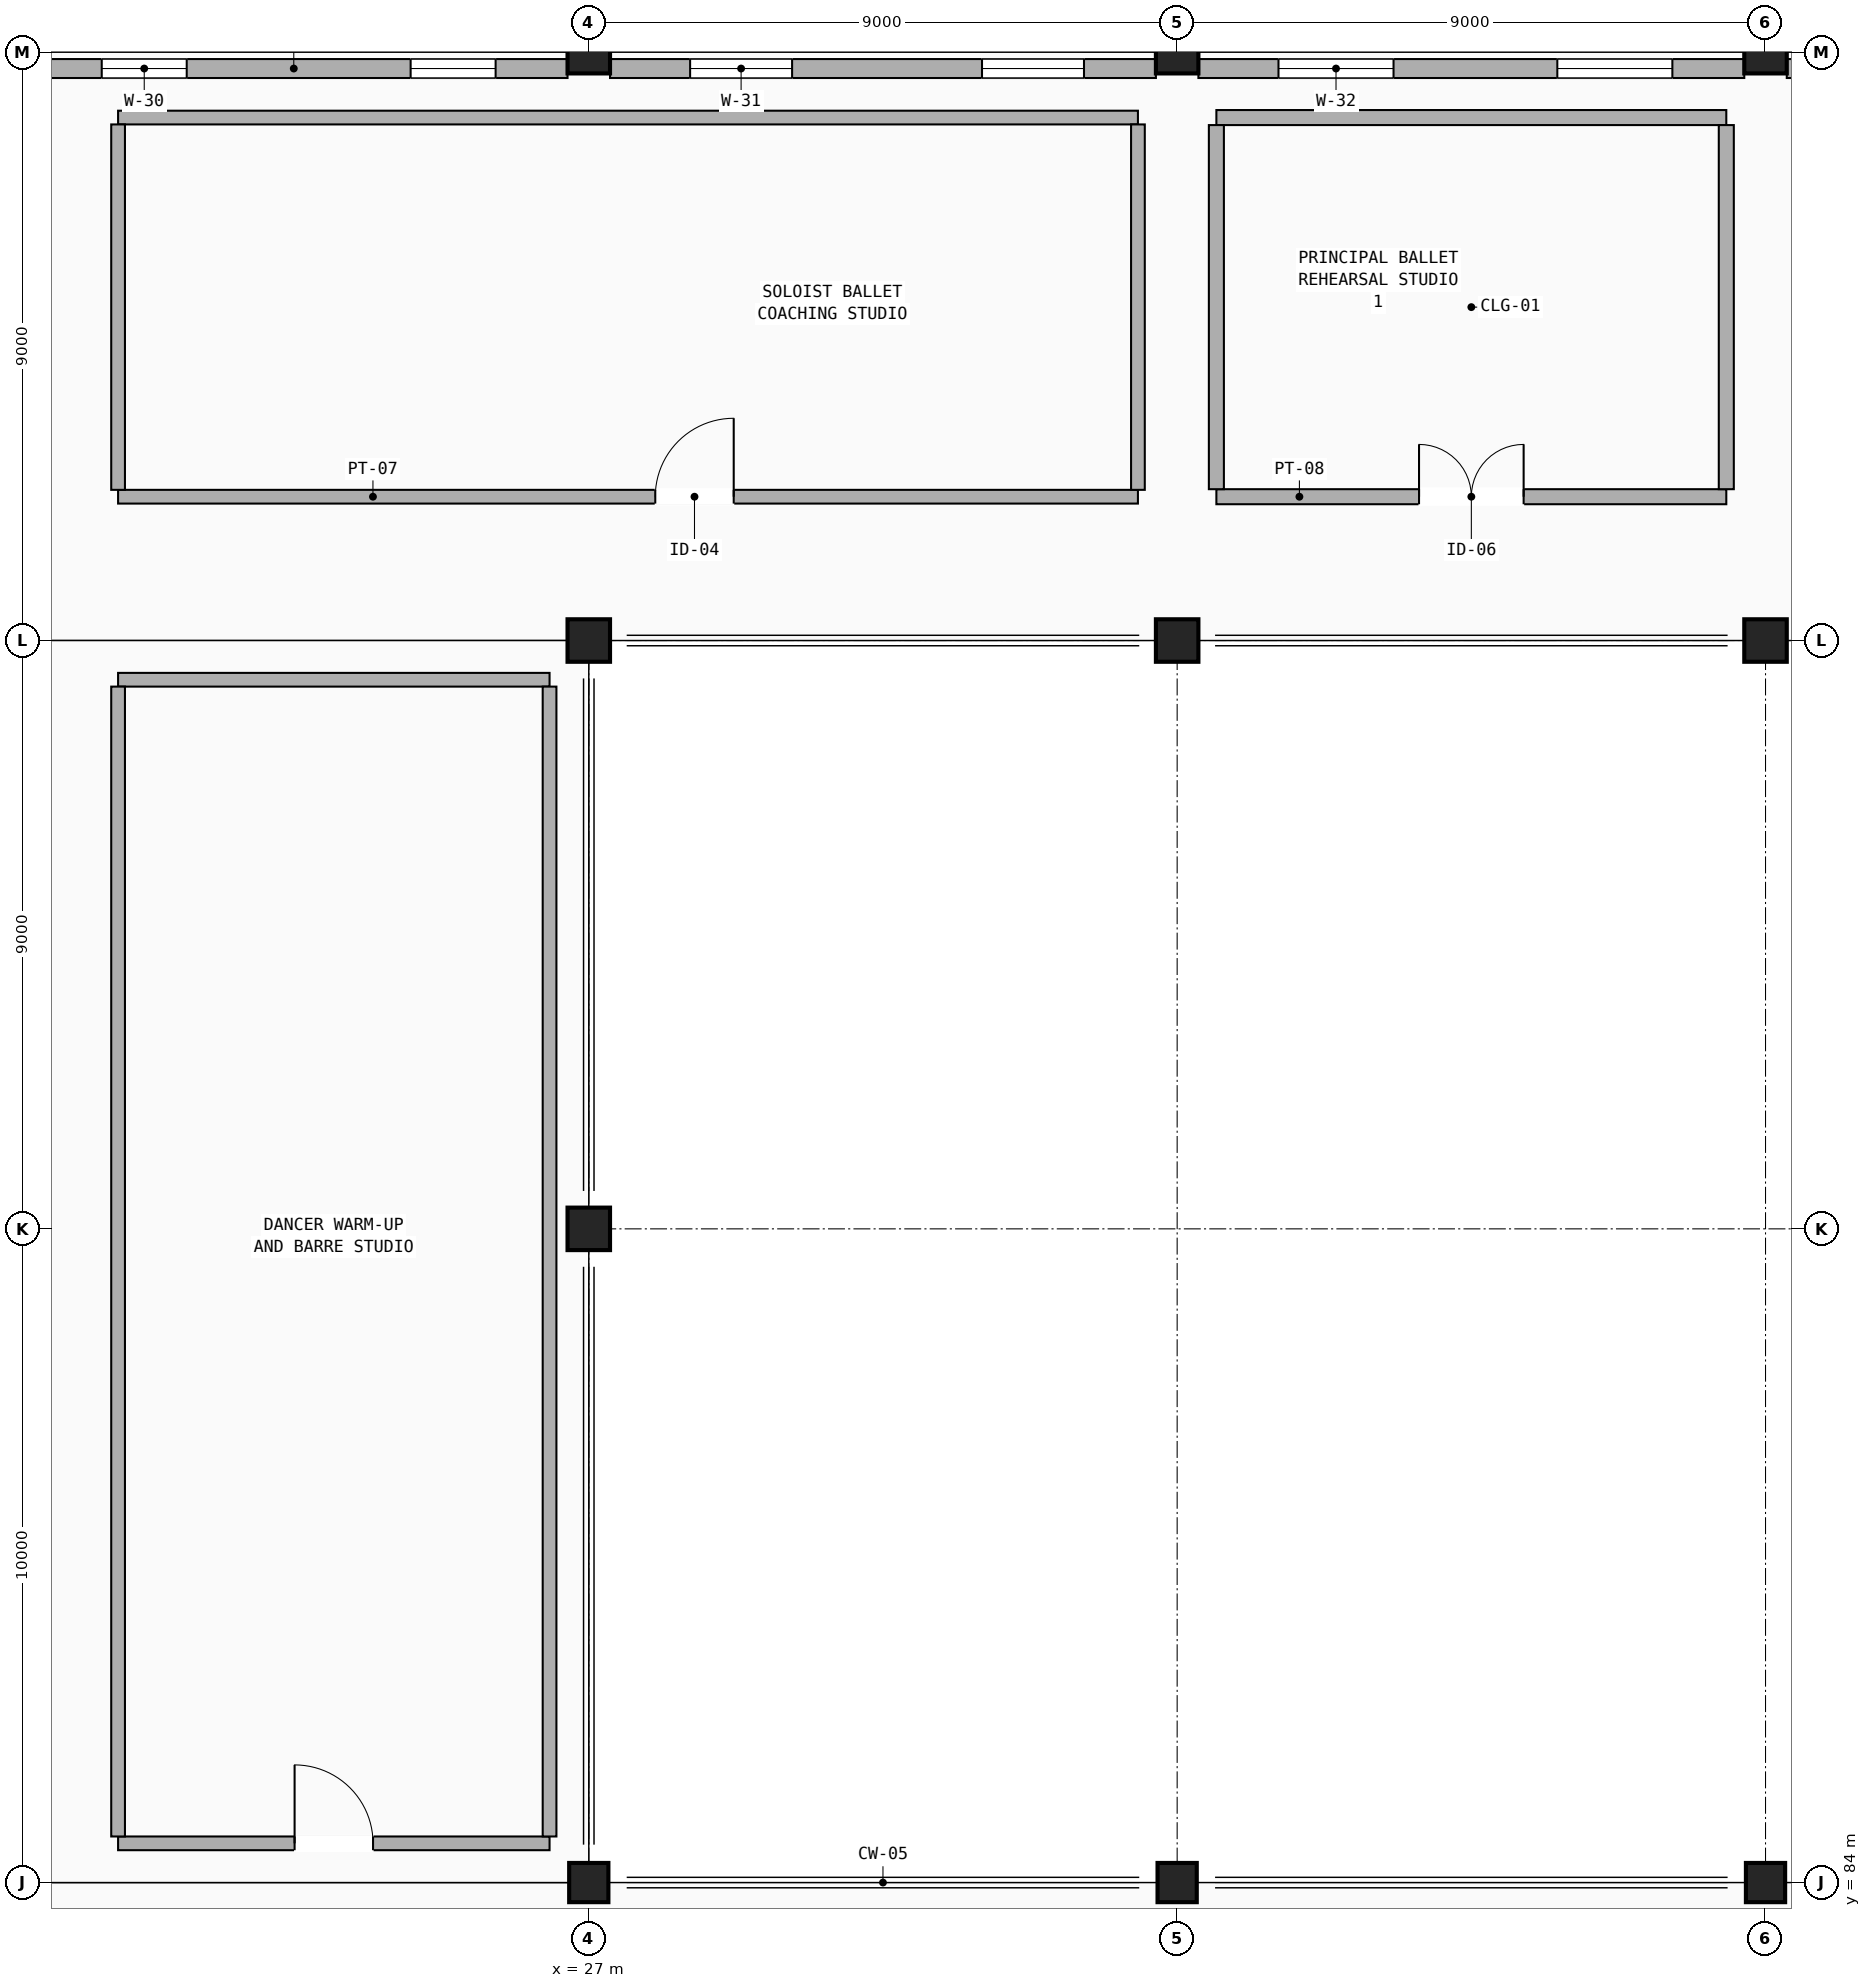
"""IFC4 building model, lengths in metres.
Left out: names, types, materials, properties, quantities, classifications, styles, units other than length and angle.
Written with IfcOpenShell. Run it as: python <this file> out.ifc"""

import sys

from ifc_helpers import new_model, si_unit, direction, frame, frame_2d, origin, origin_2d, place, context, subcontext, project, spatial, rectangle, extrude, element, fill, save


model = new_model("IFC4")
c1 = context("Model", 3, precision=1e-05, world=origin(), true_north=direction((0.0, 1.0)))
c2 = subcontext(c1, "Body", "Model", "MODEL_VIEW")
j1 = project(units=[si_unit("LENGTHUNIT", "METRE"), si_unit("PLANEANGLEUNIT", "RADIAN")], contexts=[c1])
p1 = place(None, origin())
s1 = spatial("IfcSite", under=j1, at=p1, CompositionType="ELEMENT")
p2 = place(p1, origin())
s2 = spatial("IfcBuilding", under=s1, at=p2, CompositionType="ELEMENT")
p3 = place(p2, frame((0.0, 0.0, 13.6)))
s3 = spatial("IfcBuildingStorey", under=s2, at=p3, CompositionType="ELEMENT", Elevation=13.6)
p4 = place(p3, frame((27.0, 84.0, 0.0), z_axis=(0.0, 0.0, 1.0), x_axis=(1.0, 0.0, 0.0)))
e1 = element("IfcColumn", 1, at=p4, inside=s3, PredefinedType="COLUMN", context=c2, shape_type="SweptSolid", body=[
    extrude(rectangle(XDim=0.6, YDim=0.6, at=origin_2d()), origin(), (0.0, 0.0, 1.0), 4.08),
])
for number, where, z_axis, x_axis in (
    (2, (27.0, 94.0, 0.0), (0.0, 0.0, 1.0), (1.0, 0.0, 0.0)),
    (3, (27.0, 103.0, 0.0), (0.0, 0.0, 1.0), (1.0, 0.0, 0.0)),
    (4, (27.0, 112.0, 0.0), (0.0, 0.0, 1.0), (1.0, 0.0, 0.0)),
):
    element("IfcColumn", number, at=place(p3, frame(where, z_axis=z_axis, x_axis=x_axis)), inside=s3, PredefinedType="COLUMN", context=c2, shape_type="SweptSolid", body=[
        extrude(rectangle(XDim=0.65, YDim=0.65, at=origin_2d()), origin(), (0.0, 0.0, 1.0), 4.08),
    ])
p5 = place(p3, frame((36.0, 84.0, 0.0), z_axis=(0.0, 0.0, 1.0), x_axis=(1.0, 0.0, 0.0)))
e5 = element("IfcColumn", 5, at=p5, inside=s3, PredefinedType="COLUMN", context=c2, shape_type="SweptSolid", body=[
    extrude(rectangle(XDim=0.6, YDim=0.6, at=origin_2d()), origin(), (0.0, 0.0, 1.0), 4.08),
])
for number, where, z_axis, x_axis in (
    (6, (36.0, 103.0, 0.0), (0.0, 0.0, 1.0), (1.0, 0.0, 0.0)),
    (7, (36.0, 112.0, 0.0), (0.0, 0.0, 1.0), (1.0, 0.0, 0.0)),
):
    element("IfcColumn", number, at=place(p3, frame(where, z_axis=z_axis, x_axis=x_axis)), inside=s3, PredefinedType="COLUMN", context=c2, shape_type="SweptSolid", body=[
        extrude(rectangle(XDim=0.65, YDim=0.65, at=origin_2d()), origin(), (0.0, 0.0, 1.0), 4.08),
    ])
p6 = place(p3, frame((45.0, 84.0, 0.0), z_axis=(0.0, 0.0, 1.0), x_axis=(1.0, 0.0, 0.0)))
e8 = element("IfcColumn", 8, at=p6, inside=s3, PredefinedType="COLUMN", context=c2, shape_type="SweptSolid", body=[
    extrude(rectangle(XDim=0.6, YDim=0.6, at=origin_2d()), origin(), (0.0, 0.0, 1.0), 4.08),
])
for number, where, z_axis, x_axis in (
    (9, (45.0, 103.0, 0.0), (0.0, 0.0, 1.0), (1.0, 0.0, 0.0)),
    (10, (45.0, 112.0, 0.0), (0.0, 0.0, 1.0), (1.0, 0.0, 0.0)),
):
    element("IfcColumn", number, at=place(p3, frame(where, z_axis=z_axis, x_axis=x_axis)), inside=s3, PredefinedType="COLUMN", context=c2, shape_type="SweptSolid", body=[
        extrude(rectangle(XDim=0.65, YDim=0.65, at=origin_2d()), origin(), (0.0, 0.0, 1.0), 4.08),
    ])
p7 = place(p3, frame((18.3, 111.75, 0.0), z_axis=(0.0, 0.0, 1.0), x_axis=(1.0, 0.0, 0.0)))
e11 = element("IfcWall", 11, at=p7, inside=s3, PredefinedType="STANDARD", context=c2, shape_type="SweptSolid", body=[
    extrude(rectangle(XDim=8.375, YDim=0.29, at=frame_2d((4.188, 0.0))), origin(), (0.0, 0.0, 1.0), 3.277),
])
p8 = place(p7, frame((1.25, 0.0, 0.9)))
e12 = element("IfcOpeningElement", 12, at=p8, cuts=e11, PredefinedType="OPENING", context=c2, shape_type="SweptSolid", body=[
    extrude(rectangle(XDim=1.3, YDim=1.72, at=frame_2d((0.65, 0.86))), frame((0.0, 0.155, 0.0), z_axis=(0.0, -1.0, 0.0), x_axis=(1.0, 0.0, 0.0)), (0.0, 0.0, 1.0), 0.31),
])
p9 = place(p7, frame((5.975, 0.0, 0.9)))
e13 = element("IfcOpeningElement", 13, at=p9, cuts=e11, PredefinedType="OPENING", context=c2, shape_type="SweptSolid", body=[
    extrude(rectangle(XDim=1.3, YDim=1.72, at=frame_2d((0.65, 0.86))), frame((0.0, 0.155, 0.0), z_axis=(0.0, -1.0, 0.0), x_axis=(1.0, 0.0, 0.0)), (0.0, 0.0, 1.0), 0.31),
])
p10 = place(p3, frame((27.325, 111.75, 0.0), z_axis=(0.0, 0.0, 1.0), x_axis=(1.0, 0.0, 0.0)))
e14 = element("IfcWall", 14, at=p10, inside=s3, PredefinedType="STANDARD", context=c2, shape_type="SweptSolid", body=[
    extrude(rectangle(XDim=8.35, YDim=0.29, at=frame_2d((4.175, 0.0))), origin(), (0.0, 0.0, 1.0), 3.277),
])
p11 = place(p10, frame((1.225, 0.0, 0.9)))
e15 = element("IfcOpeningElement", 15, at=p11, cuts=e14, PredefinedType="OPENING", context=c2, shape_type="SweptSolid", body=[
    extrude(rectangle(XDim=1.56, YDim=1.72, at=frame_2d((0.78, 0.86))), frame((0.0, 0.155, 0.0), z_axis=(0.0, -1.0, 0.0), x_axis=(1.0, 0.0, 0.0)), (0.0, 0.0, 1.0), 0.31),
])
p12 = place(p10, frame((5.69, 0.0, 0.9)))
e16 = element("IfcOpeningElement", 16, at=p12, cuts=e14, PredefinedType="OPENING", context=c2, shape_type="SweptSolid", body=[
    extrude(rectangle(XDim=1.56, YDim=1.72, at=frame_2d((0.78, 0.86))), frame((0.0, 0.155, 0.0), z_axis=(0.0, -1.0, 0.0), x_axis=(1.0, 0.0, 0.0)), (0.0, 0.0, 1.0), 0.31),
])
p13 = place(p3, frame((36.325, 111.75, 0.0), z_axis=(0.0, 0.0, 1.0), x_axis=(1.0, 0.0, 0.0)))
e17 = element("IfcWall", 17, at=p13, inside=s3, PredefinedType="STANDARD", context=c2, shape_type="SweptSolid", body=[
    extrude(rectangle(XDim=8.35, YDim=0.29, at=frame_2d((4.175, 0.0))), origin(), (0.0, 0.0, 1.0), 3.277),
])
p14 = place(p13, frame((1.225, 0.0, 0.9)))
e18 = element("IfcOpeningElement", 18, at=p14, cuts=e17, PredefinedType="OPENING", context=c2, shape_type="SweptSolid", body=[
    extrude(rectangle(XDim=1.76, YDim=1.72, at=frame_2d((0.88, 0.86))), frame((0.0, 0.155, 0.0), z_axis=(0.0, -1.0, 0.0), x_axis=(1.0, 0.0, 0.0)), (0.0, 0.0, 1.0), 0.31),
])
p15 = place(p13, frame((5.49, 0.0, 0.9)))
e19 = element("IfcOpeningElement", 19, at=p15, cuts=e17, PredefinedType="OPENING", context=c2, shape_type="SweptSolid", body=[
    extrude(rectangle(XDim=1.76, YDim=1.72, at=frame_2d((0.88, 0.86))), frame((0.0, 0.155, 0.0), z_axis=(0.0, -1.0, 0.0), x_axis=(1.0, 0.0, 0.0)), (0.0, 0.0, 1.0), 0.31),
])
p16 = place(p3, frame((45.325, 111.75, 0.0), z_axis=(0.0, 0.0, 1.0), x_axis=(1.0, 0.0, 0.0)))
e20 = element("IfcWall", 20, at=p16, inside=s3, PredefinedType="STANDARD", context=c2, shape_type="SweptSolid", body=[
    extrude(rectangle(XDim=8.35, YDim=0.29, at=frame_2d((4.175, 0.0))), origin(), (0.0, 0.0, 1.0), 3.277),
])
p17 = place(p16, frame((1.225, 0.0, 0.9)))
e21 = element("IfcOpeningElement", 21, at=p17, cuts=e20, PredefinedType="OPENING", context=c2, shape_type="SweptSolid", body=[
    extrude(rectangle(XDim=2.06, YDim=1.72, at=frame_2d((1.03, 0.86))), frame((0.0, 0.155, 0.0), z_axis=(0.0, -1.0, 0.0), x_axis=(1.0, 0.0, 0.0)), (0.0, 0.0, 1.0), 0.31),
])
p18 = place(p16, frame((5.19, 0.0, 0.9)))
e22 = element("IfcOpeningElement", 22, at=p18, cuts=e20, PredefinedType="OPENING", context=c2, shape_type="SweptSolid", body=[
    extrude(rectangle(XDim=2.06, YDim=1.72, at=frame_2d((1.03, 0.86))), frame((0.0, 0.155, 0.0), z_axis=(0.0, -1.0, 0.0), x_axis=(1.0, 0.0, 0.0)), (0.0, 0.0, 1.0), 0.31),
])
p19 = place(p3, frame((19.8, 105.2, 0.0), z_axis=(0.0, 0.0, 1.0), x_axis=(1.0, 0.0, 0.0)))
e23 = element("IfcWall", 23, at=p19, inside=s3, PredefinedType="PARTITIONING", context=c2, shape_type="SweptSolid", body=[
    extrude(rectangle(XDim=15.6, YDim=0.21, at=frame_2d((7.8, 0.0))), origin(), (0.0, 0.0, 1.0), 3.277),
])
p20 = place(p19, frame((8.217, 0.0, 0.0)))
e24 = element("IfcOpeningElement", 24, at=p20, cuts=e23, PredefinedType="OPENING", context=c2, shape_type="SweptSolid", body=[
    extrude(rectangle(XDim=1.2, YDim=2.2, at=frame_2d((0.6, 1.1))), frame((0.0, 0.115, 0.0), z_axis=(0.0, -1.0, 0.0), x_axis=(1.0, 0.0, 0.0)), (0.0, 0.0, 1.0), 0.23),
])
p21 = place(p3, frame((19.8, 111.0, 0.0), z_axis=(0.0, 0.0, 1.0), x_axis=(1.0, 0.0, 0.0)))
e25 = element("IfcWall", 25, at=p21, inside=s3, PredefinedType="PARTITIONING", context=c2, shape_type="SweptSolid", body=[
    extrude(rectangle(XDim=15.6, YDim=0.21, at=frame_2d((7.8, 0.0))), origin(), (0.0, 0.0, 1.0), 3.277),
])
for number, where, z_axis, x_axis in (
    (26, (19.8, 105.305, 0.0), (0.0, 0.0, 1.0), (0.0, 1.0, 0.0)),
    (27, (35.4, 105.305, 0.0), (0.0, 0.0, 1.0), (0.0, 1.0, 0.0)),
):
    element("IfcWall", number, at=place(p3, frame(where, z_axis=z_axis, x_axis=x_axis)), inside=s3, PredefinedType="PARTITIONING", context=c2, shape_type="SweptSolid", body=[
        extrude(rectangle(XDim=5.59, YDim=0.21, at=frame_2d((2.795, 0.0))), origin(), (0.0, 0.0, 1.0), 3.84),
    ])
p22 = place(p3, frame((36.6, 105.2, 0.0), z_axis=(0.0, 0.0, 1.0), x_axis=(1.0, 0.0, 0.0)))
e28 = element("IfcWall", 28, at=p22, inside=s3, PredefinedType="PARTITIONING", context=c2, shape_type="SweptSolid", body=[
    extrude(rectangle(XDim=7.8, YDim=0.23, at=frame_2d((3.9, 0.0))), origin(), (0.0, 0.0, 1.0), 3.84),
])
p23 = place(p22, frame((3.1, 0.0, 0.0)))
e29 = element("IfcOpeningElement", 29, at=p23, cuts=e28, PredefinedType="OPENING", context=c2, shape_type="SweptSolid", body=[
    extrude(rectangle(XDim=1.6, YDim=2.25, at=frame_2d((0.8, 1.125))), frame((0.0, 0.125, 0.0), z_axis=(0.0, -1.0, 0.0), x_axis=(1.0, 0.0, 0.0)), (0.0, 0.0, 1.0), 0.25),
])
p24 = place(p3, frame((36.6, 111.0, 0.0), z_axis=(0.0, 0.0, 1.0), x_axis=(1.0, 0.0, 0.0)))
e30 = element("IfcWall", 30, at=p24, inside=s3, PredefinedType="PARTITIONING", context=c2, shape_type="SweptSolid", body=[
    extrude(rectangle(XDim=7.8, YDim=0.23, at=frame_2d((3.9, 0.0))), origin(), (0.0, 0.0, 1.0), 3.84),
])
for number, where, z_axis, x_axis in (
    (31, (36.6, 105.315, 0.0), (0.0, 0.0, 1.0), (0.0, 1.0, 0.0)),
    (32, (44.4, 105.315, 0.0), (0.0, 0.0, 1.0), (0.0, 1.0, 0.0)),
):
    element("IfcWall", number, at=place(p3, frame(where, z_axis=z_axis, x_axis=x_axis)), inside=s3, PredefinedType="PARTITIONING", context=c2, shape_type="SweptSolid", body=[
        extrude(rectangle(XDim=5.57, YDim=0.23, at=frame_2d((2.785, 0.0))), origin(), (0.0, 0.0, 1.0), 3.84),
    ])
p25 = place(p3, frame((19.8, 84.6, 0.0), z_axis=(0.0, 0.0, 1.0), x_axis=(1.0, 0.0, 0.0)))
e33 = element("IfcWall", 33, at=p25, inside=s3, PredefinedType="PARTITIONING", context=c2, shape_type="SweptSolid", body=[
    extrude(rectangle(XDim=6.6, YDim=0.21, at=frame_2d((3.3, 0.0))), origin(), (0.0, 0.0, 1.0), 3.84),
])
p26 = place(p25, frame((2.7, 0.0, 0.0)))
e34 = element("IfcOpeningElement", 34, at=p26, cuts=e33, PredefinedType="OPENING", context=c2, shape_type="SweptSolid", body=[
    extrude(rectangle(XDim=1.2, YDim=2.2, at=frame_2d((0.6, 1.1))), frame((0.0, 0.115, 0.0), z_axis=(0.0, -1.0, 0.0), x_axis=(1.0, 0.0, 0.0)), (0.0, 0.0, 1.0), 0.23),
])
p27 = place(p3, frame((19.8, 102.4, 0.0), z_axis=(0.0, 0.0, 1.0), x_axis=(1.0, 0.0, 0.0)))
e35 = element("IfcWall", 35, at=p27, inside=s3, PredefinedType="PARTITIONING", context=c2, shape_type="SweptSolid", body=[
    extrude(rectangle(XDim=6.6, YDim=0.21, at=frame_2d((3.3, 0.0))), origin(), (0.0, 0.0, 1.0), 3.84),
])
for number, where, z_axis, x_axis in (
    (36, (19.8, 84.705, 0.0), (0.0, 0.0, 1.0), (0.0, 1.0, 0.0)),
    (37, (26.4, 84.705, 0.0), (0.0, 0.0, 1.0), (0.0, 1.0, 0.0)),
):
    element("IfcWall", number, at=place(p3, frame(where, z_axis=z_axis, x_axis=x_axis)), inside=s3, PredefinedType="PARTITIONING", context=c2, shape_type="SweptSolid", body=[
        extrude(rectangle(XDim=17.59, YDim=0.21, at=frame_2d((8.795, 0.0))), origin(), (0.0, 0.0, 1.0), 3.277),
    ])
p28 = place(p8, origin())
e38 = element("IfcWindow", 38, at=p28, inside=s3, PartitioningType="SINGLE_PANEL", PredefinedType="WINDOW", context=c2, shape_type="SweptSolid", body=[
    extrude(rectangle(XDim=1.3, YDim=1.72, at=frame_2d((0.65, 0.86))), frame((0.0, 0.03, 0.0), z_axis=(0.0, -1.0, 0.0), x_axis=(1.0, 0.0, 0.0)), (0.0, 0.0, 1.0), 0.06),
])
fill(e12, e38)
p29 = place(p9, origin())
e39 = element("IfcWindow", 39, at=p29, inside=s3, PartitioningType="SINGLE_PANEL", PredefinedType="WINDOW", context=c2, shape_type="SweptSolid", body=[
    extrude(rectangle(XDim=1.3, YDim=1.72, at=frame_2d((0.65, 0.86))), frame((0.0, 0.03, 0.0), z_axis=(0.0, -1.0, 0.0), x_axis=(1.0, 0.0, 0.0)), (0.0, 0.0, 1.0), 0.06),
])
fill(e13, e39)
p30 = place(p11, origin())
e40 = element("IfcWindow", 40, at=p30, inside=s3, PartitioningType="DOUBLE_PANEL_VERTICAL", PredefinedType="WINDOW", context=c2, shape_type="SweptSolid", body=[
    extrude(rectangle(XDim=1.56, YDim=1.72, at=frame_2d((0.78, 0.86))), frame((0.0, 0.03, 0.0), z_axis=(0.0, -1.0, 0.0), x_axis=(1.0, 0.0, 0.0)), (0.0, 0.0, 1.0), 0.06),
])
fill(e15, e40)
p31 = place(p12, origin())
e41 = element("IfcWindow", 41, at=p31, inside=s3, PartitioningType="DOUBLE_PANEL_VERTICAL", PredefinedType="WINDOW", context=c2, shape_type="SweptSolid", body=[
    extrude(rectangle(XDim=1.56, YDim=1.72, at=frame_2d((0.78, 0.86))), frame((0.0, 0.03, 0.0), z_axis=(0.0, -1.0, 0.0), x_axis=(1.0, 0.0, 0.0)), (0.0, 0.0, 1.0), 0.06),
])
fill(e16, e41)
p32 = place(p14, origin())
e42 = element("IfcWindow", 42, at=p32, inside=s3, PartitioningType="DOUBLE_PANEL_VERTICAL", PredefinedType="WINDOW", context=c2, shape_type="SweptSolid", body=[
    extrude(rectangle(XDim=1.76, YDim=1.72, at=frame_2d((0.88, 0.86))), frame((0.0, 0.03, 0.0), z_axis=(0.0, -1.0, 0.0), x_axis=(1.0, 0.0, 0.0)), (0.0, 0.0, 1.0), 0.06),
])
fill(e18, e42)
p33 = place(p15, origin())
e43 = element("IfcWindow", 43, at=p33, inside=s3, PartitioningType="DOUBLE_PANEL_VERTICAL", PredefinedType="WINDOW", context=c2, shape_type="SweptSolid", body=[
    extrude(rectangle(XDim=1.76, YDim=1.72, at=frame_2d((0.88, 0.86))), frame((0.0, 0.03, 0.0), z_axis=(0.0, -1.0, 0.0), x_axis=(1.0, 0.0, 0.0)), (0.0, 0.0, 1.0), 0.06),
])
fill(e19, e43)
p34 = place(p20, origin())
e44 = element("IfcDoor", 44, at=p34, inside=s3, OperationType="SINGLE_SWING_RIGHT", PredefinedType="DOOR", context=c2, shape_type="SweptSolid", body=[
    extrude(rectangle(XDim=1.2, YDim=2.2, at=frame_2d((0.6, 1.1))), frame((0.0, 0.025, 0.0), z_axis=(0.0, -1.0, 0.0), x_axis=(1.0, 0.0, 0.0)), (0.0, 0.0, 1.0), 0.05),
])
fill(e24, e44)
p35 = place(p23, origin())
e45 = element("IfcDoor", 45, at=p35, inside=s3, OperationType="DOUBLE_DOOR_SINGLE_SWING", PredefinedType="DOOR", context=c2, shape_type="SweptSolid", body=[
    extrude(rectangle(XDim=1.6, YDim=2.25, at=frame_2d((0.8, 1.125))), frame((0.0, 0.025, 0.0), z_axis=(0.0, -1.0, 0.0), x_axis=(1.0, 0.0, 0.0)), (0.0, 0.0, 1.0), 0.05),
])
fill(e29, e45)
p36 = place(p26, origin())
e46 = element("IfcDoor", 46, at=p36, inside=s3, OperationType="SINGLE_SWING_LEFT", PredefinedType="DOOR", context=c2, shape_type="SweptSolid", body=[
    extrude(rectangle(XDim=1.2, YDim=2.2, at=frame_2d((0.6, 1.1))), frame((0.0, 0.025, 0.0), z_axis=(0.0, -1.0, 0.0), x_axis=(1.0, 0.0, 0.0)), (0.0, 0.0, 1.0), 0.05),
])
fill(e34, e46)
save(model, sys.argv[1])
